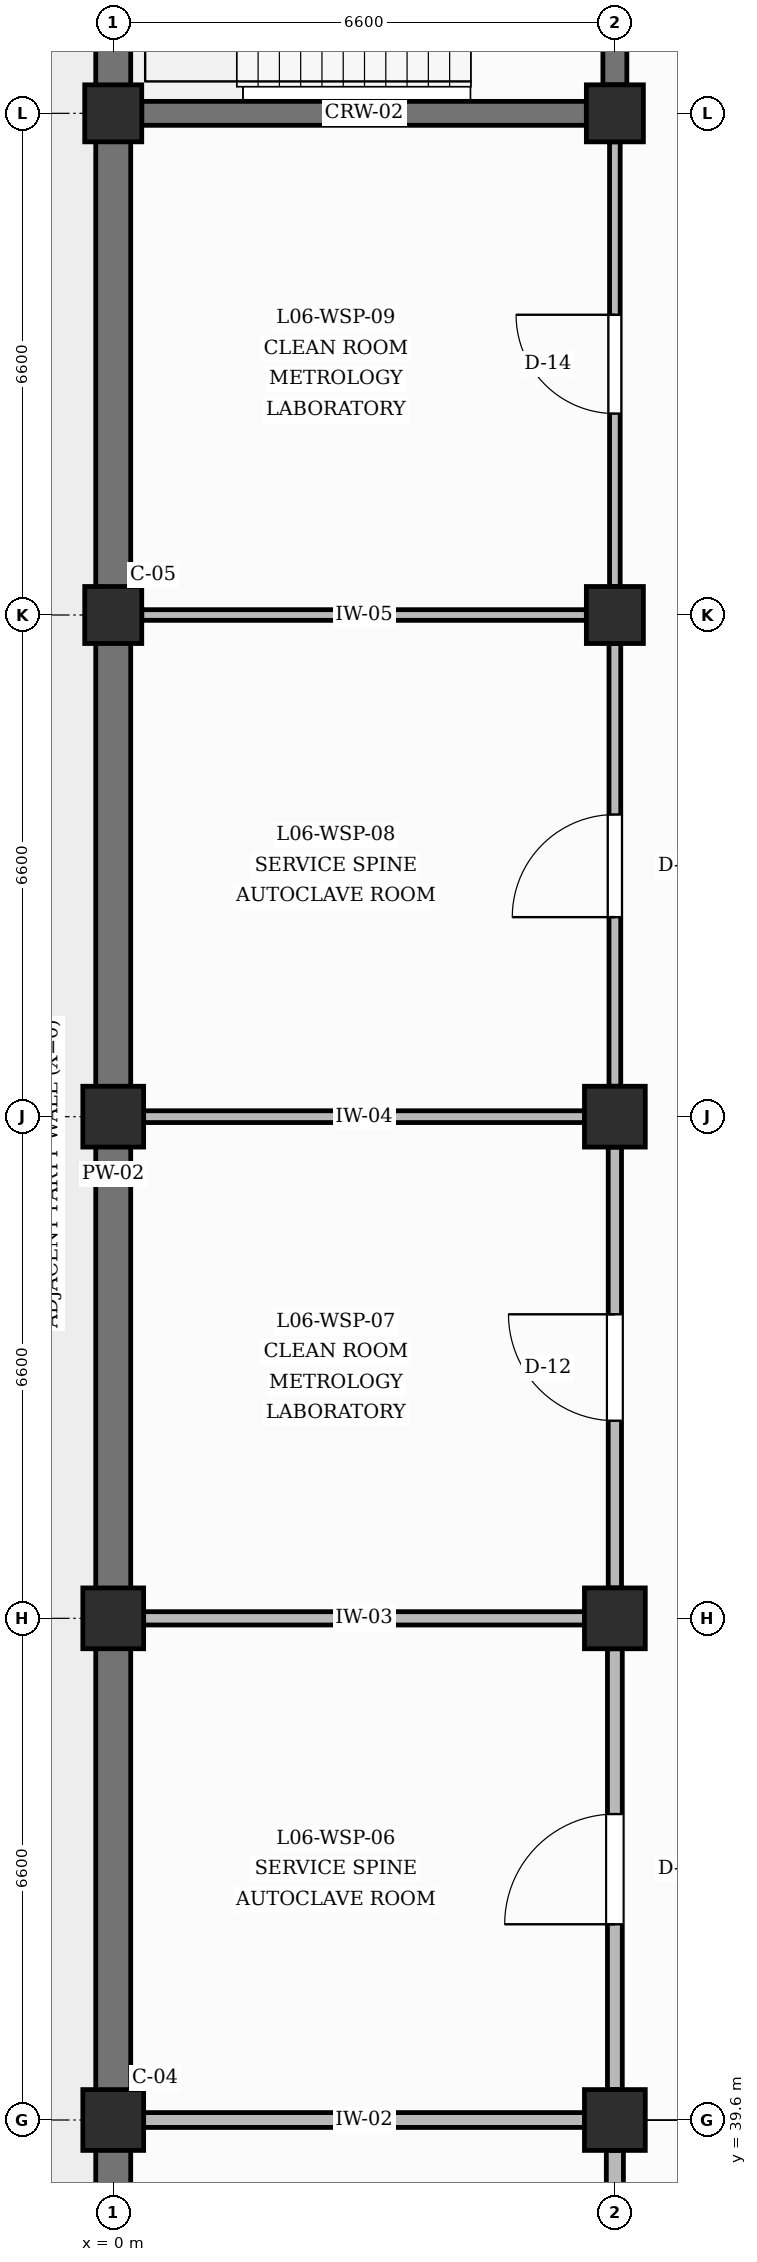
"""IFC4 building model, lengths in metres.
Left out: names, types, materials, properties, quantities, classifications, styles, units other than length and angle.
Written with IfcOpenShell. Run it as: python <this file> out.ifc"""

import sys

from ifc_helpers import new_model, si_unit, direction, frame, frame_2d, origin, origin_2d, place, context, subcontext, project, spatial, rectangle, extrude, element, fill, save


model = new_model("IFC4")
c1 = context("Model", 3, precision=1e-05, world=origin(), true_north=direction((0.0, 1.0)))
c2 = subcontext(c1, "Body", "Model", "MODEL_VIEW")
j1 = project(units=[si_unit("LENGTHUNIT", "METRE"), si_unit("PLANEANGLEUNIT", "RADIAN")], contexts=[c1])
p1 = place(None, origin())
s1 = spatial("IfcSite", under=j1, at=p1, CompositionType="ELEMENT")
p2 = place(p1, origin())
s2 = spatial("IfcBuilding", under=s1, at=p2, CompositionType="ELEMENT")
p3 = place(p2, frame((0.0, 0.0, 27.0)))
s3 = spatial("IfcBuildingStorey", under=s2, at=p3, CompositionType="ELEMENT", Elevation=27.0)
for number, where, z_axis, x_axis in (
    (1, (0.0, 39.6, 0.0), (0.0, 0.0, 1.0), (1.0, 0.0, 0.0)),
    (2, (0.0, 46.2, 0.0), (0.0, 0.0, 1.0), (1.0, 0.0, 0.0)),
    (3, (0.0, 52.8, 0.0), (0.0, 0.0, 1.0), (1.0, 0.0, 0.0)),
):
    element("IfcColumn", number, at=place(p3, frame(where, z_axis=z_axis, x_axis=x_axis)), inside=s3, PredefinedType="COLUMN", context=c2, shape_type="SweptSolid", body=[
        extrude(rectangle(XDim=0.8, YDim=0.8, at=origin_2d()), origin(), (0.0, 0.0, 1.0), 4.2),
    ])
for number, where, z_axis, x_axis in (
    (4, (0.0, 59.4, 0.0), (0.0, 0.0, 1.0), (1.0, 0.0, 0.0)),
    (5, (0.0, 66.0, 0.0), (0.0, 0.0, 1.0), (1.0, 0.0, 0.0)),
):
    element("IfcColumn", number, at=place(p3, frame(where, z_axis=z_axis, x_axis=x_axis)), inside=s3, PredefinedType="COLUMN", context=c2, shape_type="SweptSolid", body=[
        extrude(rectangle(XDim=0.75, YDim=0.75, at=origin_2d()), origin(), (0.0, 0.0, 1.0), 4.2),
    ])
for number, where, z_axis, x_axis in (
    (6, (6.6, 39.6, 0.0), (0.0, 0.0, 1.0), (1.0, 0.0, 0.0)),
    (7, (6.6, 46.2, 0.0), (0.0, 0.0, 1.0), (1.0, 0.0, 0.0)),
    (8, (6.6, 52.8, 0.0), (0.0, 0.0, 1.0), (1.0, 0.0, 0.0)),
):
    element("IfcColumn", number, at=place(p3, frame(where, z_axis=z_axis, x_axis=x_axis)), inside=s3, PredefinedType="COLUMN", context=c2, shape_type="SweptSolid", body=[
        extrude(rectangle(XDim=0.8, YDim=0.8, at=origin_2d()), origin(), (0.0, 0.0, 1.0), 4.2),
    ])
for number, where, z_axis, x_axis in (
    (9, (6.6, 59.4, 0.0), (0.0, 0.0, 1.0), (1.0, 0.0, 0.0)),
    (10, (6.6, 66.0, 0.0), (0.0, 0.0, 1.0), (1.0, 0.0, 0.0)),
):
    element("IfcColumn", number, at=place(p3, frame(where, z_axis=z_axis, x_axis=x_axis)), inside=s3, PredefinedType="COLUMN", context=c2, shape_type="SweptSolid", body=[
        extrude(rectangle(XDim=0.75, YDim=0.75, at=origin_2d()), origin(), (0.0, 0.0, 1.0), 4.2),
    ])
for number, where, z_axis, x_axis in (
    (11, (0.0, 33.4, 0.0), (0.0, 0.0, 1.0), (0.0, 1.0, 0.0)),
    (12, (0.0, 40.0, 0.0), (0.0, 0.0, 1.0), (0.0, 1.0, 0.0)),
):
    element("IfcWall", number, at=place(p3, frame(where, z_axis=z_axis, x_axis=x_axis)), inside=s3, PredefinedType="SOLIDWALL", context=c2, shape_type="SweptSolid", body=[
        extrude(rectangle(XDim=5.8, YDim=0.46, at=frame_2d((2.9, 0.0))), origin(), (0.0, 0.0, 1.0), 3.27),
    ])
p4 = place(p3, frame((0.0, 46.6, 0.0), z_axis=(0.0, 0.0, 1.0), x_axis=(0.0, 1.0, 0.0)))
e13 = element("IfcWall", 13, at=p4, inside=s3, PredefinedType="SOLIDWALL", context=c2, shape_type="SweptSolid", body=[
    extrude(rectangle(XDim=5.8, YDim=0.46, at=frame_2d((2.9, 0.0))), origin(), (0.0, 0.0, 1.0), 3.27),
])
p5 = place(p3, frame((0.0, 53.2, 0.0), z_axis=(0.0, 0.0, 1.0), x_axis=(0.0, 1.0, 0.0)))
e14 = element("IfcWall", 14, at=p5, inside=s3, PredefinedType="SOLIDWALL", context=c2, shape_type="SweptSolid", body=[
    extrude(rectangle(XDim=5.825, YDim=0.46, at=frame_2d((2.913, 0.0))), origin(), (0.0, 0.0, 1.0), 3.27),
])
for number, where, z_axis, x_axis in (
    (15, (0.0, 59.775, 0.0), (0.0, 0.0, 1.0), (0.0, 1.0, 0.0)),
    (16, (0.0, 66.375, 0.0), (0.0, 0.0, 1.0), (0.0, 1.0, 0.0)),
):
    element("IfcWall", number, at=place(p3, frame(where, z_axis=z_axis, x_axis=x_axis)), inside=s3, PredefinedType="SOLIDWALL", context=c2, shape_type="SweptSolid", body=[
        extrude(rectangle(XDim=5.85, YDim=0.46, at=frame_2d((2.925, 0.0))), origin(), (0.0, 0.0, 1.0), 3.27),
    ])
p6 = place(p3, frame((0.375, 66.0, 0.0), z_axis=(0.0, 0.0, 1.0), x_axis=(1.0, 0.0, 0.0)))
e17 = element("IfcWall", 17, at=p6, inside=s3, PredefinedType="SHEAR", context=c2, shape_type="SweptSolid", body=[
    extrude(rectangle(XDim=5.85, YDim=0.315, at=frame_2d((2.925, 0.0))), origin(), (0.0, 0.0, 1.0), 3.17),
])
p7 = place(p3, frame((6.6, 66.375, 0.0), z_axis=(0.0, 0.0, 1.0), x_axis=(0.0, 1.0, 0.0)))
e18 = element("IfcWall", 18, at=p7, inside=s3, PredefinedType="SHEAR", context=c2, shape_type="SweptSolid", body=[
    extrude(rectangle(XDim=5.85, YDim=0.315, at=frame_2d((2.925, 0.0))), origin(), (0.0, 0.0, 1.0), 3.17),
])
p8 = place(p7, frame((2.35, 0.0, 0.0)))
e19 = element("IfcOpeningElement", 19, at=p8, cuts=e18, PredefinedType="OPENING", context=c2, shape_type="SweptSolid", body=[
    extrude(rectangle(XDim=1.15, YDim=2.2, at=frame_2d((0.575, 1.1))), frame((0.0, 0.167, 0.0), z_axis=(0.0, -1.0, 0.0), x_axis=(1.0, 0.0, 0.0)), (0.0, 0.0, 1.0), 0.335),
])
p9 = place(p3, frame((6.6, 33.4, 0.0), z_axis=(0.0, 0.0, 1.0), x_axis=(0.0, 1.0, 0.0)))
e20 = element("IfcWall", 20, at=p9, inside=s3, PredefinedType="PARTITIONING", context=c2, shape_type="SweptSolid", body=[
    extrude(rectangle(XDim=5.8, YDim=0.225, at=frame_2d((2.9, 0.0))), origin(), (0.0, 0.0, 1.0), 3.17),
])
p10 = place(p9, frame((2.275, 0.0, 0.0)))
e21 = element("IfcOpeningElement", 21, at=p10, cuts=e20, PredefinedType="OPENING", context=c2, shape_type="SweptSolid", body=[
    extrude(rectangle(XDim=1.25, YDim=2.25, at=frame_2d((0.625, 1.125))), frame((0.0, 0.123, 0.0), z_axis=(0.0, -1.0, 0.0), x_axis=(1.0, 0.0, 0.0)), (0.0, 0.0, 1.0), 0.245),
])
p11 = place(p3, frame((0.4, 39.6, 0.0), z_axis=(0.0, 0.0, 1.0), x_axis=(1.0, 0.0, 0.0)))
e22 = element("IfcWall", 22, at=p11, inside=s3, PredefinedType="PARTITIONING", context=c2, shape_type="SweptSolid", body=[
    extrude(rectangle(XDim=5.8, YDim=0.195, at=frame_2d((2.9, 0.0))), origin(), (0.0, 0.0, 1.0), 3.17),
])
p12 = place(p3, frame((6.6, 40.0, 0.0), z_axis=(0.0, 0.0, 1.0), x_axis=(0.0, 1.0, 0.0)))
e23 = element("IfcWall", 23, at=p12, inside=s3, PredefinedType="PARTITIONING", context=c2, shape_type="SweptSolid", body=[
    extrude(rectangle(XDim=5.8, YDim=0.195, at=frame_2d((2.9, 0.0))), origin(), (0.0, 0.0, 1.0), 3.17),
])
p13 = place(p12, frame((2.175, 0.0, 0.0)))
e24 = element("IfcOpeningElement", 24, at=p13, cuts=e23, PredefinedType="OPENING", context=c2, shape_type="SweptSolid", body=[
    extrude(rectangle(XDim=1.45, YDim=2.25, at=frame_2d((0.725, 1.125))), frame((0.0, 0.107, 0.0), z_axis=(0.0, -1.0, 0.0), x_axis=(1.0, 0.0, 0.0)), (0.0, 0.0, 1.0), 0.215),
])
p14 = place(p3, frame((0.4, 46.2, 0.0), z_axis=(0.0, 0.0, 1.0), x_axis=(1.0, 0.0, 0.0)))
e25 = element("IfcWall", 25, at=p14, inside=s3, PredefinedType="PARTITIONING", context=c2, shape_type="SweptSolid", body=[
    extrude(rectangle(XDim=5.8, YDim=0.175, at=frame_2d((2.9, 0.0))), origin(), (0.0, 0.0, 1.0), 3.17),
])
p15 = place(p3, frame((6.6, 46.6, 0.0), z_axis=(0.0, 0.0, 1.0), x_axis=(0.0, 1.0, 0.0)))
e26 = element("IfcWall", 26, at=p15, inside=s3, PredefinedType="PARTITIONING", context=c2, shape_type="SweptSolid", body=[
    extrude(rectangle(XDim=5.8, YDim=0.175, at=frame_2d((2.9, 0.0))), origin(), (0.0, 0.0, 1.0), 3.17),
])
p16 = place(p15, frame((2.2, 0.0, 0.0)))
e27 = element("IfcOpeningElement", 27, at=p16, cuts=e26, PredefinedType="OPENING", context=c2, shape_type="SweptSolid", body=[
    extrude(rectangle(XDim=1.4, YDim=2.25, at=frame_2d((0.7, 1.125))), frame((0.0, 0.097, 0.0), z_axis=(0.0, -1.0, 0.0), x_axis=(1.0, 0.0, 0.0)), (0.0, 0.0, 1.0), 0.195),
])
p17 = place(p3, frame((0.4, 52.8, 0.0), z_axis=(0.0, 0.0, 1.0), x_axis=(1.0, 0.0, 0.0)))
e28 = element("IfcWall", 28, at=p17, inside=s3, PredefinedType="PARTITIONING", context=c2, shape_type="SweptSolid", body=[
    extrude(rectangle(XDim=5.8, YDim=0.155, at=frame_2d((2.9, 0.0))), origin(), (0.0, 0.0, 1.0), 3.17),
])
p18 = place(p3, frame((6.6, 53.2, 0.0), z_axis=(0.0, 0.0, 1.0), x_axis=(0.0, 1.0, 0.0)))
e29 = element("IfcWall", 29, at=p18, inside=s3, PredefinedType="PARTITIONING", context=c2, shape_type="SweptSolid", body=[
    extrude(rectangle(XDim=5.825, YDim=0.155, at=frame_2d((2.913, 0.0))), origin(), (0.0, 0.0, 1.0), 3.17),
])
p19 = place(p18, frame((2.225, 0.0, 0.0)))
e30 = element("IfcOpeningElement", 30, at=p19, cuts=e29, PredefinedType="OPENING", context=c2, shape_type="SweptSolid", body=[
    extrude(rectangle(XDim=1.35, YDim=2.3, at=frame_2d((0.675, 1.15))), frame((0.0, 0.087, 0.0), z_axis=(0.0, -1.0, 0.0), x_axis=(1.0, 0.0, 0.0)), (0.0, 0.0, 1.0), 0.175),
])
p20 = place(p3, frame((0.375, 59.4, 0.0), z_axis=(0.0, 0.0, 1.0), x_axis=(1.0, 0.0, 0.0)))
e31 = element("IfcWall", 31, at=p20, inside=s3, PredefinedType="PARTITIONING", context=c2, shape_type="SweptSolid", body=[
    extrude(rectangle(XDim=5.85, YDim=0.14, at=frame_2d((2.925, 0.0))), origin(), (0.0, 0.0, 1.0), 3.17),
])
p21 = place(p3, frame((6.6, 59.775, 0.0), z_axis=(0.0, 0.0, 1.0), x_axis=(0.0, 1.0, 0.0)))
e32 = element("IfcWall", 32, at=p21, inside=s3, PredefinedType="PARTITIONING", context=c2, shape_type="SweptSolid", body=[
    extrude(rectangle(XDim=5.85, YDim=0.14, at=frame_2d((2.925, 0.0))), origin(), (0.0, 0.0, 1.0), 3.17),
])
p22 = place(p21, frame((2.275, 0.0, 0.0)))
e33 = element("IfcOpeningElement", 33, at=p22, cuts=e32, PredefinedType="OPENING", context=c2, shape_type="SweptSolid", body=[
    extrude(rectangle(XDim=1.3, YDim=2.3, at=frame_2d((0.65, 1.15))), frame((0.0, 0.08, 0.0), z_axis=(0.0, -1.0, 0.0), x_axis=(1.0, 0.0, 0.0)), (0.0, 0.0, 1.0), 0.16),
])
p23 = place(p13, origin())
e34 = element("IfcDoor", 34, at=p23, inside=s3, OperationType="SINGLE_SWING_LEFT", PredefinedType="DOOR", context=c2, shape_type="SweptSolid", body=[
    extrude(rectangle(XDim=1.45, YDim=2.25, at=frame_2d((0.725, 1.125))), frame((0.0, 0.025, 0.0), z_axis=(0.0, -1.0, 0.0), x_axis=(1.0, 0.0, 0.0)), (0.0, 0.0, 1.0), 0.05),
])
fill(e24, e34)
p24 = place(p16, origin())
e35 = element("IfcDoor", 35, at=p24, inside=s3, OperationType="SINGLE_SWING_RIGHT", PredefinedType="DOOR", context=c2, shape_type="SweptSolid", body=[
    extrude(rectangle(XDim=1.4, YDim=2.25, at=frame_2d((0.7, 1.125))), frame((0.0, 0.025, 0.0), z_axis=(0.0, -1.0, 0.0), x_axis=(1.0, 0.0, 0.0)), (0.0, 0.0, 1.0), 0.05),
])
fill(e27, e35)
p25 = place(p19, origin())
e36 = element("IfcDoor", 36, at=p25, inside=s3, OperationType="SINGLE_SWING_LEFT", PredefinedType="DOOR", context=c2, shape_type="SweptSolid", body=[
    extrude(rectangle(XDim=1.35, YDim=2.3, at=frame_2d((0.675, 1.15))), frame((0.0, 0.025, 0.0), z_axis=(0.0, -1.0, 0.0), x_axis=(1.0, 0.0, 0.0)), (0.0, 0.0, 1.0), 0.05),
])
fill(e30, e36)
p26 = place(p22, origin())
e37 = element("IfcDoor", 37, at=p26, inside=s3, OperationType="SINGLE_SWING_RIGHT", PredefinedType="DOOR", context=c2, shape_type="SweptSolid", body=[
    extrude(rectangle(XDim=1.3, YDim=2.3, at=frame_2d((0.65, 1.15))), frame((0.0, 0.025, 0.0), z_axis=(0.0, -1.0, 0.0), x_axis=(1.0, 0.0, 0.0)), (0.0, 0.0, 1.0), 0.05),
])
fill(e33, e37)
save(model, sys.argv[1])
